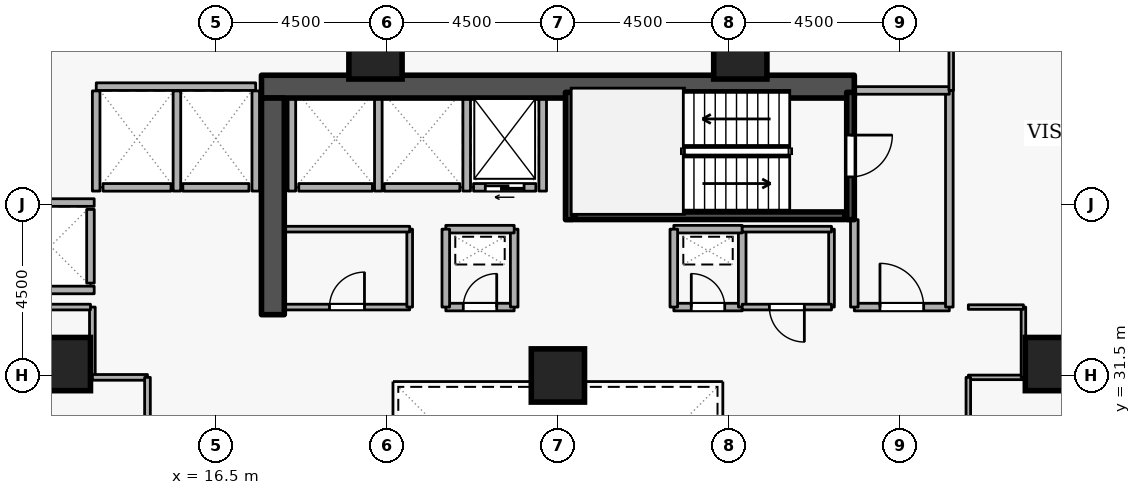
"""IFC4 building model, lengths in metres.
Left out: names, types, materials, properties, quantities, classifications, styles, units other than length and angle.
Written with IfcOpenShell. Run it as: python <this file> out.ifc"""

import sys

from ifc_helpers import new_model, si_unit, direction, frame, frame_2d, origin, origin_2d, place, context, subcontext, project, spatial, rectangle, extrude, element, fill, save


model = new_model("IFC4")
c1 = context("Model", 3, precision=1e-05, world=origin(), true_north=direction((0.0, 1.0)))
c2 = subcontext(c1, "Body", "Model", "MODEL_VIEW")
j1 = project(units=[si_unit("LENGTHUNIT", "METRE"), si_unit("PLANEANGLEUNIT", "RADIAN")], contexts=[c1])
p1 = place(None, origin())
s1 = spatial("IfcSite", under=j1, at=p1, CompositionType="ELEMENT")
p2 = place(p1, origin())
s2 = spatial("IfcBuilding", under=s1, at=p2, CompositionType="ELEMENT")
p3 = place(p2, frame((0.0, 0.0, 57.3)))
s3 = spatial("IfcBuildingStorey", under=s2, at=p3, CompositionType="ELEMENT", Elevation=57.3)
p4 = place(p3, frame((17.7, 39.1, 0.0), z_axis=(0.0, 0.0, 1.0), x_axis=(1.0, 0.0, 0.0)))
e1 = element("IfcWall", 1, at=p4, inside=s3, PredefinedType="SHEAR", context=c2, shape_type="SweptSolid", body=[
    extrude(rectangle(XDim=15.6, YDim=0.6, at=frame_2d((7.8, 0.0))), origin(), (0.0, 0.0, 1.0), 3.6),
])
p5 = place(p3, frame((18.0, 33.1, 0.0), z_axis=(0.0, 0.0, 1.0), x_axis=(0.0, 1.0, 0.0)))
e2 = element("IfcWall", 2, at=p5, inside=s3, PredefinedType="SHEAR", context=c2, shape_type="SweptSolid", body=[
    extrude(rectangle(XDim=5.7, YDim=0.6, at=frame_2d((2.85, 0.0))), origin(), (0.0, 0.0, 1.0), 3.6),
])
for number, where, z_axis, x_axis in (
    (3, (12.5, 31.8, 0.0), (0.0, 0.0, 1.0), (1.0, 0.0, 0.0)),
    (4, (38.5, 31.8, 0.0), (0.0, 0.0, 1.0), (1.0, 0.0, 0.0)),
    (5, (20.7, 40.0, 0.0), (0.0, 0.0, 1.0), (1.0, 0.0, 0.0)),
    (6, (30.3, 40.0, 0.0), (0.0, 0.0, 1.0), (1.0, 0.0, 0.0)),
    (7, (25.5, 31.5, 0.0), (0.0, 0.0, 1.0), (1.0, 0.0, 0.0)),
):
    element("IfcColumn", number, at=place(p3, frame(where, z_axis=z_axis, x_axis=x_axis)), inside=s3, PredefinedType="COLUMN", context=c2, shape_type="SweptSolid", body=[
        extrude(rectangle(XDim=1.4, YDim=1.4, at=origin_2d()), origin(), (0.0, 0.0, 1.0), 3.6),
    ])
p6 = place(p3, frame((24.92, 36.45, 0.0), z_axis=(0.0, 0.0, 1.0), x_axis=(-1.0, 0.0, 0.0)))
e8 = element("IfcWall", 8, at=p6, inside=s3, PredefinedType="STANDARD", context=c2, shape_type="SweptSolid", body=[
    extrude(rectangle(XDim=1.64, YDim=0.2, at=frame_2d((0.82, 0.0))), origin(), (0.0, 0.0, 1.0), 3.34),
])
p7 = place(p6, frame((0.31, 0.0, 0.0)))
e9 = element("IfcOpeningElement", 9, at=p7, cuts=e8, PredefinedType="OPENING", context=c2, shape_type="SweptSolid", body=[
    extrude(rectangle(XDim=1.02, YDim=2.06, at=frame_2d((0.51, 1.03))), frame((0.0, 0.11, 0.0), z_axis=(0.0, -1.0, 0.0), x_axis=(1.0, 0.0, 0.0)), (0.0, 0.0, 1.0), 0.22),
])
p8 = place(p3, frame((22.92, 36.45, 0.0), z_axis=(0.0, 0.0, 1.0), x_axis=(-1.0, 0.0, 0.0)))
e10 = element("IfcWall", 10, at=p8, inside=s3, PredefinedType="STANDARD", context=c2, shape_type="SweptSolid", body=[
    extrude(rectangle(XDim=1.99, YDim=0.2, at=frame_2d((0.995, 0.0))), origin(), (0.0, 0.0, 1.0), 3.34),
])
p9 = place(p3, frame((20.62, 36.45, 0.0), z_axis=(0.0, 0.0, 1.0), x_axis=(-1.0, 0.0, 0.0)))
e11 = element("IfcWall", 11, at=p9, inside=s3, PredefinedType="STANDARD", context=c2, shape_type="SweptSolid", body=[
    extrude(rectangle(XDim=1.94, YDim=0.2, at=frame_2d((0.97, 0.0))), origin(), (0.0, 0.0, 1.0), 3.34),
])
p10 = place(p3, frame((17.37, 36.45, 0.0), z_axis=(0.0, 0.0, 1.0), x_axis=(-1.0, 0.0, 0.0)))
e12 = element("IfcWall", 12, at=p10, inside=s3, PredefinedType="STANDARD", context=c2, shape_type="SweptSolid", body=[
    extrude(rectangle(XDim=1.74, YDim=0.2, at=frame_2d((0.87, 0.0))), origin(), (0.0, 0.0, 1.0), 3.34),
])
p11 = place(p3, frame((15.32, 36.45, 0.0), z_axis=(0.0, 0.0, 1.0), x_axis=(-1.0, 0.0, 0.0)))
e13 = element("IfcWall", 13, at=p11, inside=s3, PredefinedType="STANDARD", context=c2, shape_type="SweptSolid", body=[
    extrude(rectangle(XDim=1.79, YDim=0.2, at=frame_2d((0.895, 0.0))), origin(), (0.0, 0.0, 1.0), 3.34),
])
p12 = place(p3, frame((13.2, 33.93, 0.0), z_axis=(0.0, 0.0, 1.0), x_axis=(0.0, 1.0, 0.0)))
e14 = element("IfcWall", 14, at=p12, inside=s3, PredefinedType="STANDARD", context=c2, shape_type="SweptSolid", body=[
    extrude(rectangle(XDim=1.94, YDim=0.2, at=frame_2d((0.97, 0.0))), origin(), (0.0, 0.0, 1.0), 3.34),
])
for number, where, z_axis, x_axis in (
    (15, (25.1, 36.352, 0.0), (0.0, 0.0, 1.0), (0.0, 1.0, 0.0)),
    (16, (23.1, 36.352, 0.0), (0.0, 0.0, 1.0), (0.0, 1.0, 0.0)),
    (17, (20.775, 36.352, 0.0), (0.0, 0.0, 1.0), (0.0, 1.0, 0.0)),
    (18, (18.5, 36.352, 0.0), (0.0, 0.0, 1.0), (0.0, 1.0, 0.0)),
):
    element("IfcWall", number, at=place(p3, frame(where, z_axis=z_axis, x_axis=x_axis)), inside=s3, PredefinedType="STANDARD", context=c2, shape_type="SweptSolid", body=[
        extrude(rectangle(XDim=2.436, YDim=0.2, at=frame_2d((1.218, 0.0))), origin(), (0.0, 0.0, 1.0), 3.34),
    ])
p13 = place(p3, frame((13.352, 39.1, 0.0), z_axis=(0.0, 0.0, 1.0), x_axis=(1.0, 0.0, 0.0)))
e19 = element("IfcWall", 19, at=p13, inside=s3, PredefinedType="STANDARD", context=c2, shape_type="SweptSolid", body=[
    extrude(rectangle(XDim=4.196, YDim=0.2, at=frame_2d((2.098, 0.0))), origin(), (0.0, 0.0, 1.0), 3.34),
])
p14 = place(p3, frame((17.55, 36.352, 0.0), z_axis=(0.0, 0.0, 1.0), x_axis=(0.0, 1.0, 0.0)))
e20 = element("IfcWall", 20, at=p14, inside=s3, PredefinedType="STANDARD", context=c2, shape_type="SweptSolid", body=[
    extrude(rectangle(XDim=2.636, YDim=0.2, at=frame_2d((1.318, 0.0))), origin(), (0.0, 0.0, 1.0), 2.545),
])
for number, where, z_axis, x_axis in (
    (21, (15.475, 36.352, 0.0), (0.0, 0.0, 1.0), (0.0, 1.0, 0.0)),
    (22, (13.35, 36.352, 0.0), (0.0, 0.0, 1.0), (0.0, 1.0, 0.0)),
):
    element("IfcWall", number, at=place(p3, frame(where, z_axis=z_axis, x_axis=x_axis)), inside=s3, PredefinedType="STANDARD", context=c2, shape_type="SweptSolid", body=[
        extrude(rectangle(XDim=2.636, YDim=0.2, at=frame_2d((1.318, 0.0))), origin(), (0.0, 0.0, 1.0), 3.34),
    ])
for number, where, z_axis, x_axis in (
    (23, (11.002, 36.05, 0.0), (0.0, 0.0, 1.0), (1.0, 0.0, 0.0)),
    (24, (11.002, 33.75, 0.0), (0.0, 0.0, 1.0), (1.0, 0.0, 0.0)),
):
    element("IfcWall", number, at=place(p3, frame(where, z_axis=z_axis, x_axis=x_axis)), inside=s3, PredefinedType="STANDARD", context=c2, shape_type="SweptSolid", body=[
        extrude(rectangle(XDim=2.296, YDim=0.2, at=frame_2d((1.148, 0.0))), origin(), (0.0, 0.0, 1.0), 3.34),
    ])
p15 = place(p3, frame((33.2, 38.95, 0.0), z_axis=(0.0, 0.0, 1.0), x_axis=(0.0, -1.0, 0.0)))
e25 = element("IfcWall", 25, at=p15, inside=s3, PredefinedType="SHEAR", context=c2, shape_type="SweptSolid", body=[
    extrude(rectangle(XDim=3.35, YDim=0.2, at=frame_2d((1.675, 0.0))), origin(), (0.0, 0.0, 1.0), 3.6),
])
p16 = place(p15, frame((1.125, 0.0, 0.0)))
e26 = element("IfcOpeningElement", 26, at=p16, cuts=e25, PredefinedType="OPENING", context=c2, shape_type="SweptSolid", body=[
    extrude(rectangle(XDim=1.1, YDim=2.1, at=frame_2d((0.55, 1.05))), frame((0.0, 0.11, 0.0), z_axis=(0.0, -1.0, 0.0), x_axis=(1.0, 0.0, 0.0)), (0.0, 0.0, 1.0), 0.22),
])
p17 = place(p3, frame((25.8, 35.6, 0.0), z_axis=(0.0, 0.0, 1.0), x_axis=(0.0, 1.0, 0.0)))
e27 = element("IfcWall", 27, at=p17, inside=s3, PredefinedType="SHEAR", context=c2, shape_type="SweptSolid", body=[
    extrude(rectangle(XDim=3.35, YDim=0.2, at=frame_2d((1.675, 0.0))), origin(), (0.0, 0.0, 1.0), 3.6),
])
p18 = place(p3, frame((25.95, 35.703, 0.0), z_axis=(0.0, 0.0, 1.0), x_axis=(1.0, 0.0, 0.0)))
e28 = element("IfcWall", 28, at=p18, inside=s3, PredefinedType="SHEAR", context=c2, shape_type="SweptSolid", body=[
    extrude(rectangle(XDim=7.1, YDim=0.2, at=frame_2d((3.55, 0.0))), origin(), (0.0, 0.0, 1.0), 3.6),
])
p19 = place(p3, frame((33.3, 33.3, 0.0), z_axis=(0.0, 0.0, 1.0), x_axis=(1.0, 0.0, 0.0)))
e29 = element("IfcWall", 29, at=p19, inside=s3, PredefinedType="STANDARD", context=c2, shape_type="SweptSolid", body=[
    extrude(rectangle(XDim=2.5, YDim=0.2, at=frame_2d((1.25, 0.0))), origin(), (0.0, 0.0, 1.0), 3.34),
])
p20 = place(p19, frame((0.675, 0.0, 0.0)))
e30 = element("IfcOpeningElement", 30, at=p20, cuts=e29, PredefinedType="OPENING", context=c2, shape_type="SweptSolid", body=[
    extrude(rectangle(XDim=1.15, YDim=2.1, at=frame_2d((0.575, 1.05))), frame((0.0, 0.11, 0.0), z_axis=(0.0, -1.0, 0.0), x_axis=(1.0, 0.0, 0.0)), (0.0, 0.0, 1.0), 0.22),
])
p21 = place(p3, frame((35.8, 33.3, 0.0), z_axis=(0.0, 0.0, 1.0), x_axis=(0.0, 1.0, 0.0)))
e31 = element("IfcWall", 31, at=p21, inside=s3, PredefinedType="STANDARD", context=c2, shape_type="SweptSolid", body=[
    extrude(rectangle(XDim=5.7, YDim=0.2, at=frame_2d((2.85, 0.0))), origin(), (0.0, 0.0, 1.0), 3.34),
])
p22 = place(p3, frame((35.8, 39.0, 0.0), z_axis=(0.0, 0.0, 1.0), x_axis=(-1.0, 0.0, 0.0)))
e32 = element("IfcWall", 32, at=p22, inside=s3, PredefinedType="STANDARD", context=c2, shape_type="SweptSolid", body=[
    extrude(rectangle(XDim=2.5, YDim=0.2, at=frame_2d((1.25, 0.0))), origin(), (0.0, 0.0, 1.0), 3.34),
])
p23 = place(p3, frame((33.3, 35.6, 0.0), z_axis=(0.0, 0.0, 1.0), x_axis=(0.0, -1.0, 0.0)))
e33 = element("IfcWall", 33, at=p23, inside=s3, PredefinedType="STANDARD", context=c2, shape_type="SweptSolid", body=[
    extrude(rectangle(XDim=2.3, YDim=0.2, at=frame_2d((1.15, 0.0))), origin(), (0.0, 0.0, 1.0), 2.545),
])
p24 = place(p3, frame((22.55, 33.3, 0.0), z_axis=(0.0, 0.0, 1.0), x_axis=(1.0, 0.0, 0.0)))
e34 = element("IfcWall", 34, at=p24, inside=s3, PredefinedType="STANDARD", context=c2, shape_type="SweptSolid", body=[
    extrude(rectangle(XDim=1.8, YDim=0.2, at=frame_2d((0.9, 0.0))), origin(), (0.0, 0.0, 1.0), 3.34),
])
p25 = place(p24, frame((0.46, 0.0, 0.0)))
e35 = element("IfcOpeningElement", 35, at=p25, cuts=e34, PredefinedType="OPENING", context=c2, shape_type="SweptSolid", body=[
    extrude(rectangle(XDim=0.88, YDim=2.04, at=frame_2d((0.44, 1.02))), frame((0.0, 0.11, 0.0), z_axis=(0.0, -1.0, 0.0), x_axis=(1.0, 0.0, 0.0)), (0.0, 0.0, 1.0), 0.22),
])
p26 = place(p3, frame((24.35, 33.3, 0.0), z_axis=(0.0, 0.0, 1.0), x_axis=(0.0, 1.0, 0.0)))
e36 = element("IfcWall", 36, at=p26, inside=s3, PredefinedType="STANDARD", context=c2, shape_type="SweptSolid", body=[
    extrude(rectangle(XDim=2.05, YDim=0.2, at=frame_2d((1.025, 0.0))), origin(), (0.0, 0.0, 1.0), 3.34),
])
p27 = place(p3, frame((24.35, 35.35, 0.0), z_axis=(0.0, 0.0, 1.0), x_axis=(-1.0, 0.0, 0.0)))
e37 = element("IfcWall", 37, at=p27, inside=s3, PredefinedType="STANDARD", context=c2, shape_type="SweptSolid", body=[
    extrude(rectangle(XDim=1.8, YDim=0.2, at=frame_2d((0.9, 0.0))), origin(), (0.0, 0.0, 1.0), 3.34),
])
p28 = place(p3, frame((22.55, 35.35, 0.0), z_axis=(0.0, 0.0, 1.0), x_axis=(0.0, -1.0, 0.0)))
e38 = element("IfcWall", 38, at=p28, inside=s3, PredefinedType="STANDARD", context=c2, shape_type="SweptSolid", body=[
    extrude(rectangle(XDim=2.05, YDim=0.2, at=frame_2d((1.025, 0.0))), origin(), (0.0, 0.0, 1.0), 3.34),
])
p29 = place(p3, frame((28.55, 33.3, 0.0), z_axis=(0.0, 0.0, 1.0), x_axis=(1.0, 0.0, 0.0)))
e39 = element("IfcWall", 39, at=p29, inside=s3, PredefinedType="STANDARD", context=c2, shape_type="SweptSolid", body=[
    extrude(rectangle(XDim=1.8, YDim=0.2, at=frame_2d((0.9, 0.0))), origin(), (0.0, 0.0, 1.0), 3.34),
])
p30 = place(p29, frame((0.46, 0.0, 0.0)))
e40 = element("IfcOpeningElement", 40, at=p30, cuts=e39, PredefinedType="OPENING", context=c2, shape_type="SweptSolid", body=[
    extrude(rectangle(XDim=0.88, YDim=2.04, at=frame_2d((0.44, 1.02))), frame((0.0, 0.11, 0.0), z_axis=(0.0, -1.0, 0.0), x_axis=(1.0, 0.0, 0.0)), (0.0, 0.0, 1.0), 0.22),
])
p31 = place(p3, frame((30.35, 33.3, 0.0), z_axis=(0.0, 0.0, 1.0), x_axis=(0.0, 1.0, 0.0)))
e41 = element("IfcWall", 41, at=p31, inside=s3, PredefinedType="STANDARD", context=c2, shape_type="SweptSolid", body=[
    extrude(rectangle(XDim=2.05, YDim=0.2, at=frame_2d((1.025, 0.0))), origin(), (0.0, 0.0, 1.0), 3.34),
])
p32 = place(p3, frame((30.35, 35.35, 0.0), z_axis=(0.0, 0.0, 1.0), x_axis=(-1.0, 0.0, 0.0)))
e42 = element("IfcWall", 42, at=p32, inside=s3, PredefinedType="STANDARD", context=c2, shape_type="SweptSolid", body=[
    extrude(rectangle(XDim=1.8, YDim=0.2, at=frame_2d((0.9, 0.0))), origin(), (0.0, 0.0, 1.0), 3.34),
])
p33 = place(p3, frame((28.55, 35.35, 0.0), z_axis=(0.0, 0.0, 1.0), x_axis=(0.0, -1.0, 0.0)))
e43 = element("IfcWall", 43, at=p33, inside=s3, PredefinedType="STANDARD", context=c2, shape_type="SweptSolid", body=[
    extrude(rectangle(XDim=2.05, YDim=0.2, at=frame_2d((1.025, 0.0))), origin(), (0.0, 0.0, 1.0), 3.34),
])
p34 = place(p3, frame((18.3, 33.3, 0.0), z_axis=(0.0, 0.0, 1.0), x_axis=(1.0, 0.0, 0.0)))
e44 = element("IfcWall", 44, at=p34, inside=s3, PredefinedType="PARTITIONING", context=c2, shape_type="SweptSolid", body=[
    extrude(rectangle(XDim=3.3, YDim=0.15, at=frame_2d((1.65, 0.0))), origin(), (0.0, 0.0, 1.0), 3.34),
])
p35 = place(p34, frame((1.19, 0.0, 0.0)))
e45 = element("IfcOpeningElement", 45, at=p35, cuts=e44, PredefinedType="OPENING", context=c2, shape_type="SweptSolid", body=[
    extrude(rectangle(XDim=0.92, YDim=2.08, at=frame_2d((0.46, 1.04))), frame((0.0, 0.085, 0.0), z_axis=(0.0, -1.0, 0.0), x_axis=(1.0, 0.0, 0.0)), (0.0, 0.0, 1.0), 0.17),
])
p36 = place(p3, frame((21.6, 33.3, 0.0), z_axis=(0.0, 0.0, 1.0), x_axis=(0.0, 1.0, 0.0)))
e46 = element("IfcWall", 46, at=p36, inside=s3, PredefinedType="PARTITIONING", context=c2, shape_type="SweptSolid", body=[
    extrude(rectangle(XDim=2.05, YDim=0.15, at=frame_2d((1.025, 0.0))), origin(), (0.0, 0.0, 1.0), 3.34),
])
p37 = place(p3, frame((21.6, 35.35, 0.0), z_axis=(0.0, 0.0, 1.0), x_axis=(-1.0, 0.0, 0.0)))
e47 = element("IfcWall", 47, at=p37, inside=s3, PredefinedType="PARTITIONING", context=c2, shape_type="SweptSolid", body=[
    extrude(rectangle(XDim=3.3, YDim=0.15, at=frame_2d((1.65, 0.0))), origin(), (0.0, 0.0, 1.0), 3.34),
])
p38 = place(p3, frame((32.7, 35.35, 0.0), z_axis=(0.0, 0.0, 1.0), x_axis=(0.0, -1.0, 0.0)))
e48 = element("IfcWall", 48, at=p38, inside=s3, PredefinedType="PARTITIONING", context=c2, shape_type="SweptSolid", body=[
    extrude(rectangle(XDim=2.05, YDim=0.15, at=frame_2d((1.025, 0.0))), origin(), (0.0, 0.0, 1.0), 2.545),
])
p39 = place(p3, frame((32.7, 33.3, 0.0), z_axis=(0.0, 0.0, 1.0), x_axis=(-1.0, 0.0, 0.0)))
e49 = element("IfcWall", 49, at=p39, inside=s3, PredefinedType="PARTITIONING", context=c2, shape_type="SweptSolid", body=[
    extrude(rectangle(XDim=2.35, YDim=0.15, at=frame_2d((1.175, 0.0))), origin(), (0.0, 0.0, 1.0), 3.34),
])
p40 = place(p39, frame((0.715, 0.0, 0.0)))
e50 = element("IfcOpeningElement", 50, at=p40, cuts=e49, PredefinedType="OPENING", context=c2, shape_type="SweptSolid", body=[
    extrude(rectangle(XDim=0.92, YDim=2.08, at=frame_2d((0.46, 1.04))), frame((0.0, 0.085, 0.0), z_axis=(0.0, -1.0, 0.0), x_axis=(1.0, 0.0, 0.0)), (0.0, 0.0, 1.0), 0.17),
])
p41 = place(p3, frame((30.35, 35.35, 0.0), z_axis=(0.0, 0.0, 1.0), x_axis=(1.0, 0.0, 0.0)))
e51 = element("IfcWall", 51, at=p41, inside=s3, PredefinedType="PARTITIONING", context=c2, shape_type="SweptSolid", body=[
    extrude(rectangle(XDim=2.35, YDim=0.15, at=frame_2d((1.175, 0.0))), origin(), (0.0, 0.0, 1.0), 3.34),
])
p42 = place(p3, frame((13.25, 33.3, 0.0), z_axis=(0.0, 0.0, 1.0), x_axis=(0.0, -1.0, 0.0)))
e52 = element("IfcWall", 52, at=p42, inside=s3, PredefinedType="PARTITIONING", context=c2, shape_type="SweptSolid", body=[
    extrude(rectangle(XDim=1.85, YDim=0.15, at=frame_2d((0.925, 0.0))), origin(), (0.0, 0.0, 1.0), 3.34),
])
p43 = place(p3, frame((13.25, 31.45, 0.0), z_axis=(0.0, 0.0, 1.0), x_axis=(1.0, 0.0, 0.0)))
e53 = element("IfcWall", 53, at=p43, inside=s3, PredefinedType="PARTITIONING", context=c2, shape_type="SweptSolid", body=[
    extrude(rectangle(XDim=1.45, YDim=0.15, at=frame_2d((0.725, 0.0))), origin(), (0.0, 0.0, 1.0), 3.34),
])
p44 = place(p3, frame((14.7, 31.45, 0.0), z_axis=(0.0, 0.0, 1.0), x_axis=(0.0, -1.0, 0.0)))
e54 = element("IfcWall", 54, at=p44, inside=s3, PredefinedType="PARTITIONING", context=c2, shape_type="SweptSolid", body=[
    extrude(rectangle(XDim=4.45, YDim=0.15, at=frame_2d((2.225, 0.0))), origin(), (0.0, 0.0, 1.0), 3.34),
])
p45 = place(p44, frame((1.575, 0.0, 0.0)))
e55 = element("IfcOpeningElement", 55, at=p45, cuts=e54, PredefinedType="OPENING", context=c2, shape_type="SweptSolid", body=[
    extrude(rectangle(XDim=1.3, YDim=2.12, at=frame_2d((0.65, 1.06))), frame((0.0, 0.085, 0.0), z_axis=(0.0, -1.0, 0.0), x_axis=(1.0, 0.0, 0.0)), (0.0, 0.0, 1.0), 0.17),
])
p46 = place(p3, frame((10.9, 33.3, 0.0), z_axis=(0.0, 0.0, 1.0), x_axis=(1.0, 0.0, 0.0)))
e56 = element("IfcWall", 56, at=p46, inside=s3, PredefinedType="PARTITIONING", context=c2, shape_type="SweptSolid", body=[
    extrude(rectangle(XDim=2.3, YDim=0.15, at=frame_2d((1.15, 0.0))), origin(), (0.0, 0.0, 1.0), 3.34),
])
p47 = place(p3, frame((36.3, 31.45, 0.0), z_axis=(0.0, 0.0, 1.0), x_axis=(1.0, 0.0, 0.0)))
e57 = element("IfcWall", 57, at=p47, inside=s3, PredefinedType="PARTITIONING", context=c2, shape_type="SweptSolid", body=[
    extrude(rectangle(XDim=1.45, YDim=0.12, at=frame_2d((0.725, 0.0))), origin(), (0.0, 0.0, 1.0), 3.34),
])
p48 = place(p3, frame((37.75, 31.45, 0.0), z_axis=(0.0, 0.0, 1.0), x_axis=(0.0, 1.0, 0.0)))
e58 = element("IfcWall", 58, at=p48, inside=s3, PredefinedType="PARTITIONING", context=c2, shape_type="SweptSolid", body=[
    extrude(rectangle(XDim=1.85, YDim=0.12, at=frame_2d((0.925, 0.0))), origin(), (0.0, 0.0, 1.0), 3.34),
])
p49 = place(p3, frame((37.75, 33.3, 0.0), z_axis=(0.0, 0.0, 1.0), x_axis=(-1.0, 0.0, 0.0)))
e59 = element("IfcWall", 59, at=p49, inside=s3, PredefinedType="PARTITIONING", context=c2, shape_type="SweptSolid", body=[
    extrude(rectangle(XDim=1.45, YDim=0.12, at=frame_2d((0.725, 0.0))), origin(), (0.0, 0.0, 1.0), 3.34),
])
p50 = place(p3, frame((35.85, 39.0, 0.0), z_axis=(0.0, 0.0, 1.0), x_axis=(0.0, 1.0, 0.0)))
e60 = element("IfcWall", 60, at=p50, inside=s3, PredefinedType="PARTITIONING", context=c2, shape_type="SweptSolid", body=[
    extrude(rectangle(XDim=6.22, YDim=0.12, at=frame_2d((3.11, 0.0))), origin(), (0.0, 0.0, 1.0), 3.34),
])
p51 = place(p3, frame((36.3, 27.0, 0.0), z_axis=(0.0, 0.0, 1.0), x_axis=(0.0, 1.0, 0.0)))
e61 = element("IfcWall", 61, at=p51, inside=s3, PredefinedType="PARTITIONING", context=c2, shape_type="SweptSolid", body=[
    extrude(rectangle(XDim=4.45, YDim=0.12, at=frame_2d((2.225, 0.0))), origin(), (0.0, 0.0, 1.0), 3.34),
])
p52 = place(p51, frame((1.7, 0.0, 0.0)))
e62 = element("IfcOpeningElement", 62, at=p52, cuts=e61, PredefinedType="OPENING", context=c2, shape_type="SweptSolid", body=[
    extrude(rectangle(XDim=1.05, YDim=2.1, at=frame_2d((0.525, 1.05))), frame((0.0, 0.07, 0.0), z_axis=(0.0, -1.0, 0.0), x_axis=(1.0, 0.0, 0.0)), (0.0, 0.0, 1.0), 0.14),
])
p53 = place(p7, origin())
e63 = element("IfcDoor", 63, at=p53, inside=s3, OperationType="SLIDING_TO_LEFT", PredefinedType="DOOR", context=c2, shape_type="SweptSolid", body=[
    extrude(rectangle(XDim=1.02, YDim=2.06, at=frame_2d((0.51, 1.03))), frame((0.0, 0.025, 0.0), z_axis=(0.0, -1.0, 0.0), x_axis=(1.0, 0.0, 0.0)), (0.0, 0.0, 1.0), 0.05),
])
fill(e9, e63)
p54 = place(p16, origin())
e64 = element("IfcDoor", 64, at=p54, inside=s3, OperationType="SINGLE_SWING_LEFT", PredefinedType="DOOR", context=c2, shape_type="SweptSolid", body=[
    extrude(rectangle(XDim=1.1, YDim=2.1, at=frame_2d((0.55, 1.05))), frame((0.0, 0.025, 0.0), z_axis=(0.0, -1.0, 0.0), x_axis=(1.0, 0.0, 0.0)), (0.0, 0.0, 1.0), 0.05),
])
fill(e26, e64)
p55 = place(p20, origin())
e65 = element("IfcDoor", 65, at=p55, inside=s3, OperationType="SINGLE_SWING_LEFT", PredefinedType="DOOR", context=c2, shape_type="SweptSolid", body=[
    extrude(rectangle(XDim=1.15, YDim=2.1, at=frame_2d((0.575, 1.05))), frame((0.0, 0.025, 0.0), z_axis=(0.0, -1.0, 0.0), x_axis=(1.0, 0.0, 0.0)), (0.0, 0.0, 1.0), 0.05),
])
fill(e30, e65)
p56 = place(p25, origin())
e66 = element("IfcDoor", 66, at=p56, inside=s3, OperationType="SINGLE_SWING_RIGHT", PredefinedType="DOOR", context=c2, shape_type="SweptSolid", body=[
    extrude(rectangle(XDim=0.88, YDim=2.04, at=frame_2d((0.44, 1.02))), frame((0.0, 0.025, 0.0), z_axis=(0.0, -1.0, 0.0), x_axis=(1.0, 0.0, 0.0)), (0.0, 0.0, 1.0), 0.05),
])
fill(e35, e66)
p57 = place(p30, origin())
e67 = element("IfcDoor", 67, at=p57, inside=s3, OperationType="SINGLE_SWING_LEFT", PredefinedType="DOOR", context=c2, shape_type="SweptSolid", body=[
    extrude(rectangle(XDim=0.88, YDim=2.04, at=frame_2d((0.44, 1.02))), frame((0.0, 0.025, 0.0), z_axis=(0.0, -1.0, 0.0), x_axis=(1.0, 0.0, 0.0)), (0.0, 0.0, 1.0), 0.05),
])
fill(e40, e67)
p58 = place(p35, origin())
e68 = element("IfcDoor", 68, at=p58, inside=s3, OperationType="SINGLE_SWING_RIGHT", PredefinedType="DOOR", context=c2, shape_type="SweptSolid", body=[
    extrude(rectangle(XDim=0.92, YDim=2.08, at=frame_2d((0.46, 1.04))), frame((0.0, 0.025, 0.0), z_axis=(0.0, -1.0, 0.0), x_axis=(1.0, 0.0, 0.0)), (0.0, 0.0, 1.0), 0.05),
])
fill(e45, e68)
p59 = place(p40, origin())
e69 = element("IfcDoor", 69, at=p59, inside=s3, OperationType="SINGLE_SWING_LEFT", PredefinedType="DOOR", context=c2, shape_type="SweptSolid", body=[
    extrude(rectangle(XDim=0.92, YDim=2.08, at=frame_2d((0.46, 1.04))), frame((0.0, 0.025, 0.0), z_axis=(0.0, -1.0, 0.0), x_axis=(1.0, 0.0, 0.0)), (0.0, 0.0, 1.0), 0.05),
])
fill(e50, e69)
save(model, sys.argv[1])
